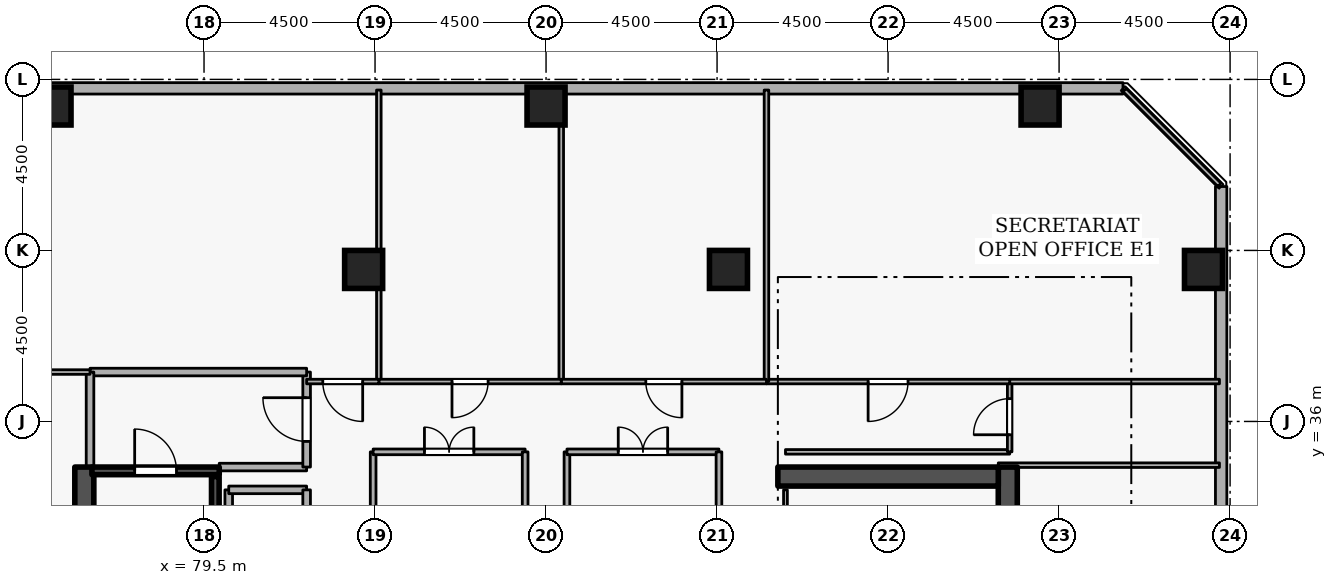
"""IFC4 building model, lengths in metres.
Left out: names, types, materials, properties, quantities, classifications, styles, units other than length and angle.
Written with IfcOpenShell. Run it as: python <this file> out.ifc"""

import sys

from ifc_helpers import new_model, si_unit, direction, frame, frame_2d, origin, origin_2d, place, context, subcontext, project, spatial, rectangle, extrude, element, fill, save


model = new_model("IFC4")
c1 = context("Model", 3, precision=1e-05, world=origin(), true_north=direction((0.0, 1.0)))
c2 = subcontext(c1, "Body", "Model", "MODEL_VIEW")
j1 = project(units=[si_unit("LENGTHUNIT", "METRE"), si_unit("PLANEANGLEUNIT", "RADIAN")], contexts=[c1])
p1 = place(None, origin())
s1 = spatial("IfcSite", under=j1, at=p1, CompositionType="ELEMENT")
p2 = place(p1, origin())
s2 = spatial("IfcBuilding", under=s1, at=p2, CompositionType="ELEMENT")
p3 = place(p2, frame((0.0, 0.0, 225.9)))
s3 = spatial("IfcBuildingStorey", under=s2, at=p3, CompositionType="ELEMENT", Elevation=225.9)
p4 = place(p3, frame((100.65, 19.2, 0.0), z_axis=(0.0, 0.0, 1.0), x_axis=(0.0, 1.0, 0.0)))
e1 = element("IfcWall", 1, at=p4, inside=s3, PredefinedType="SHEAR", context=c2, shape_type="SweptSolid", body=[
    extrude(rectangle(XDim=15.6, YDim=0.5, at=frame_2d((7.8, 0.0))), origin(), (0.0, 0.0, 1.0), 3.6),
])
p5 = place(p3, frame((94.6, 34.55, 0.0), z_axis=(0.0, 0.0, 1.0), x_axis=(1.0, 0.0, 0.0)))
e2 = element("IfcWall", 2, at=p5, inside=s3, PredefinedType="SHEAR", context=c2, shape_type="SweptSolid", body=[
    extrude(rectangle(XDim=5.8, YDim=0.5, at=frame_2d((2.9, 0.0))), origin(), (0.0, 0.0, 1.0), 3.6),
])
p6 = place(p3, frame((76.35, 19.2, 0.0), z_axis=(0.0, 0.0, 1.0), x_axis=(0.0, 1.0, 0.0)))
e3 = element("IfcWall", 3, at=p6, inside=s3, PredefinedType="SHEAR", context=c2, shape_type="SweptSolid", body=[
    extrude(rectangle(XDim=15.6, YDim=0.5, at=frame_2d((7.8, 0.0))), origin(), (0.0, 0.0, 1.0), 3.6),
])
for number, where, z_axis, x_axis in (
    (4, (105.8, 40.0, 0.0), (0.0, 0.0, 1.0), (1.0, 0.0, 0.0)),
    (5, (101.5, 44.3, 0.0), (0.0, 0.0, 1.0), (1.0, 0.0, 0.0)),
    (6, (88.5, 44.3, 0.0), (0.0, 0.0, 1.0), (1.0, 0.0, 0.0)),
    (7, (75.5, 44.3, 0.0), (0.0, 0.0, 1.0), (1.0, 0.0, 0.0)),
    (8, (93.3, 40.0, 0.0), (0.0, 0.0, 1.0), (1.0, 0.0, 0.0)),
    (9, (83.7, 40.0, 0.0), (0.0, 0.0, 1.0), (1.0, 0.0, 0.0)),
):
    element("IfcColumn", number, at=place(p3, frame(where, z_axis=z_axis, x_axis=x_axis)), inside=s3, PredefinedType="COLUMN", context=c2, shape_type="SweptSolid", body=[
        extrude(rectangle(XDim=1.0, YDim=1.0, at=origin_2d()), origin(), (0.0, 0.0, 1.0), 3.6),
    ])
p7 = place(p3, frame((106.265, 5.819, 0.0), z_axis=(0.0, 0.0, 1.0), x_axis=(0.0, 1.0, 0.0)))
e10 = element("IfcWall", 10, at=p7, inside=s3, PredefinedType="STANDARD", context=c2, shape_type="SweptSolid", body=[
    extrude(rectangle(XDim=36.363, YDim=0.3, at=frame_2d((18.181, 0.0))), origin(), (0.0, 0.0, 1.0), 2.22),
])
p8 = place(p7, frame((1.8, 0.0, 0.72)))
e11 = element("IfcOpeningElement", 11, at=p8, cuts=e10, PredefinedType="OPENING", context=c2, shape_type="SweptSolid", body=[
    extrude(rectangle(XDim=1.35, YDim=1.05, at=frame_2d((0.675, 0.525))), frame((0.0, 0.16, 0.0), z_axis=(0.0, -1.0, 0.0), x_axis=(1.0, 0.0, 0.0)), (0.0, 0.0, 1.0), 0.32),
])
p9 = place(p3, frame((103.681, 44.765, 0.0), z_axis=(0.0, 0.0, 1.0), x_axis=(-1.0, 0.0, 0.0)))
e12 = element("IfcWall", 12, at=p9, inside=s3, PredefinedType="STANDARD", context=c2, shape_type="SweptSolid", body=[
    extrude(rectangle(XDim=36.363, YDim=0.3, at=frame_2d((18.181, 0.0))), origin(), (0.0, 0.0, 1.0), 2.22),
])
p10 = place(p9, frame((30.6, 0.0, 0.72)))
e13 = element("IfcOpeningElement", 13, at=p10, cuts=e12, PredefinedType="OPENING", context=c2, shape_type="SweptSolid", body=[
    extrude(rectangle(XDim=1.35, YDim=1.05, at=frame_2d((0.675, 0.525))), frame((0.0, 0.16, 0.0), z_axis=(0.0, -1.0, 0.0), x_axis=(1.0, 0.0, 0.0)), (0.0, 0.0, 1.0), 0.32),
])
p11 = place(p3, frame((76.55, 34.7, 0.0), z_axis=(0.0, 0.0, 1.0), x_axis=(1.0, 0.0, 0.0)))
e14 = element("IfcWall", 14, at=p11, inside=s3, PredefinedType="SHEAR", context=c2, shape_type="SweptSolid", body=[
    extrude(rectangle(XDim=3.35, YDim=0.2, at=frame_2d((1.675, 0.0))), origin(), (0.0, 0.0, 1.0), 3.6),
])
p12 = place(p11, frame((1.125, 0.0, 0.0)))
e15 = element("IfcOpeningElement", 15, at=p12, cuts=e14, PredefinedType="OPENING", context=c2, shape_type="SweptSolid", body=[
    extrude(rectangle(XDim=1.1, YDim=2.1, at=frame_2d((0.55, 1.05))), frame((0.0, 0.11, 0.0), z_axis=(0.0, -1.0, 0.0), x_axis=(1.0, 0.0, 0.0)), (0.0, 0.0, 1.0), 0.22),
])
p13 = place(p3, frame((79.797, 27.45, 0.0), z_axis=(0.0, 0.0, 1.0), x_axis=(0.0, 1.0, 0.0)))
e16 = element("IfcWall", 16, at=p13, inside=s3, PredefinedType="SHEAR", context=c2, shape_type="SweptSolid", body=[
    extrude(rectangle(XDim=7.1, YDim=0.2, at=frame_2d((3.55, 0.0))), origin(), (0.0, 0.0, 1.0), 3.6),
])
p14 = place(p3, frame((79.9, 34.8, 0.0), z_axis=(0.0, 0.0, 1.0), x_axis=(1.0, 0.0, 0.0)))
e17 = element("IfcWall", 17, at=p14, inside=s3, PredefinedType="STANDARD", context=c2, shape_type="SweptSolid", body=[
    extrude(rectangle(XDim=2.3, YDim=0.2, at=frame_2d((1.15, 0.0))), origin(), (0.0, 0.0, 1.0), 2.505),
])
p15 = place(p3, frame((82.2, 34.8, 0.0), z_axis=(0.0, 0.0, 1.0), x_axis=(0.0, 1.0, 0.0)))
e18 = element("IfcWall", 18, at=p15, inside=s3, PredefinedType="STANDARD", context=c2, shape_type="SweptSolid", body=[
    extrude(rectangle(XDim=2.5, YDim=0.2, at=frame_2d((1.25, 0.0))), origin(), (0.0, 0.0, 1.0), 3.3),
])
p16 = place(p15, frame((0.675, 0.0, 0.0)))
e19 = element("IfcOpeningElement", 19, at=p16, cuts=e18, PredefinedType="OPENING", context=c2, shape_type="SweptSolid", body=[
    extrude(rectangle(XDim=1.15, YDim=2.1, at=frame_2d((0.575, 1.05))), frame((0.0, 0.11, 0.0), z_axis=(0.0, -1.0, 0.0), x_axis=(1.0, 0.0, 0.0)), (0.0, 0.0, 1.0), 0.22),
])
p17 = place(p3, frame((82.2, 37.3, 0.0), z_axis=(0.0, 0.0, 1.0), x_axis=(-1.0, 0.0, 0.0)))
e20 = element("IfcWall", 20, at=p17, inside=s3, PredefinedType="STANDARD", context=c2, shape_type="SweptSolid", body=[
    extrude(rectangle(XDim=5.7, YDim=0.2, at=frame_2d((2.85, 0.0))), origin(), (0.0, 0.0, 1.0), 3.3),
])
p18 = place(p3, frame((76.5, 37.3, 0.0), z_axis=(0.0, 0.0, 1.0), x_axis=(0.0, -1.0, 0.0)))
e21 = element("IfcWall", 21, at=p18, inside=s3, PredefinedType="STANDARD", context=c2, shape_type="SweptSolid", body=[
    extrude(rectangle(XDim=2.5, YDim=0.2, at=frame_2d((1.25, 0.0))), origin(), (0.0, 0.0, 1.0), 3.3),
])
p19 = place(p3, frame((80.15, 31.85, 0.0), z_axis=(0.0, 0.0, 1.0), x_axis=(0.0, 1.0, 0.0)))
e22 = element("IfcWall", 22, at=p19, inside=s3, PredefinedType="STANDARD", context=c2, shape_type="SweptSolid", body=[
    extrude(rectangle(XDim=2.35, YDim=0.2, at=frame_2d((1.175, 0.0))), origin(), (0.0, 0.0, 1.0), 3.3),
])
p20 = place(p3, frame((80.15, 34.2, 0.0), z_axis=(0.0, 0.0, 1.0), x_axis=(1.0, 0.0, 0.0)))
e23 = element("IfcWall", 23, at=p20, inside=s3, PredefinedType="STANDARD", context=c2, shape_type="SweptSolid", body=[
    extrude(rectangle(XDim=2.05, YDim=0.2, at=frame_2d((1.025, 0.0))), origin(), (0.0, 0.0, 1.0), 2.505),
])
p21 = place(p3, frame((82.2, 34.2, 0.0), z_axis=(0.0, 0.0, 1.0), x_axis=(0.0, -1.0, 0.0)))
e24 = element("IfcWall", 24, at=p21, inside=s3, PredefinedType="STANDARD", context=c2, shape_type="SweptSolid", body=[
    extrude(rectangle(XDim=2.35, YDim=0.2, at=frame_2d((1.175, 0.0))), origin(), (0.0, 0.0, 1.0), 3.3),
])
p22 = place(p21, frame((0.6, 0.0, 0.0)))
e25 = element("IfcOpeningElement", 25, at=p22, cuts=e24, PredefinedType="OPENING", context=c2, shape_type="SweptSolid", body=[
    extrude(rectangle(XDim=1.15, YDim=2.1, at=frame_2d((0.575, 1.05))), frame((0.0, 0.11, 0.0), z_axis=(0.0, -1.0, 0.0), x_axis=(1.0, 0.0, 0.0)), (0.0, 0.0, 1.0), 0.22),
])
p23 = place(p3, frame((94.8, 32.05, 0.0), z_axis=(0.0, 0.0, 1.0), x_axis=(0.0, 1.0, 0.0)))
e26 = element("IfcWall", 26, at=p23, inside=s3, PredefinedType="PARTITIONING", context=c2, shape_type="SweptSolid", body=[
    extrude(rectangle(XDim=2.15, YDim=0.1, at=frame_2d((1.075, 0.0))), origin(), (0.0, 0.0, 1.0), 3.3),
])
p24 = place(p23, frame((0.6, 0.0, 0.0)))
e27 = element("IfcOpeningElement", 27, at=p24, cuts=e26, PredefinedType="OPENING", context=c2, shape_type="SweptSolid", body=[
    extrude(rectangle(XDim=0.95, YDim=2.1, at=frame_2d((0.475, 1.05))), frame((0.0, 0.06, 0.0), z_axis=(0.0, -1.0, 0.0), x_axis=(1.0, 0.0, 0.0)), (0.0, 0.0, 1.0), 0.12),
])
p25 = place(p3, frame((94.8, 35.2, 0.0), z_axis=(0.0, 0.0, 1.0), x_axis=(1.0, 0.0, 0.0)))
e28 = element("IfcWall", 28, at=p25, inside=s3, PredefinedType="PARTITIONING", context=c2, shape_type="SweptSolid", body=[
    extrude(rectangle(XDim=5.9, YDim=0.12, at=frame_2d((2.95, 0.0))), origin(), (0.0, 0.0, 1.0), 3.3),
])
p26 = place(p3, frame((100.7, 35.2, 0.0), z_axis=(0.0, 0.0, 1.0), x_axis=(0.0, 1.0, 0.0)))
e29 = element("IfcWall", 29, at=p26, inside=s3, PredefinedType="PARTITIONING", context=c2, shape_type="SweptSolid", body=[
    extrude(rectangle(XDim=1.85, YDim=0.12, at=frame_2d((0.925, 0.0))), origin(), (0.0, 0.0, 1.0), 3.3),
])
p27 = place(p26, frame((0.45, 0.0, 0.0)))
e30 = element("IfcOpeningElement", 30, at=p27, cuts=e29, PredefinedType="OPENING", context=c2, shape_type="SweptSolid", body=[
    extrude(rectangle(XDim=0.95, YDim=2.1, at=frame_2d((0.475, 1.05))), frame((0.0, 0.07, 0.0), z_axis=(0.0, -1.0, 0.0), x_axis=(1.0, 0.0, 0.0)), (0.0, 0.0, 1.0), 0.14),
])
p28 = place(p3, frame((100.7, 37.05, 0.0), z_axis=(0.0, 0.0, 1.0), x_axis=(1.0, 0.0, 0.0)))
e31 = element("IfcWall", 31, at=p28, inside=s3, PredefinedType="PARTITIONING", context=c2, shape_type="SweptSolid", body=[
    extrude(rectangle(XDim=5.52, YDim=0.12, at=frame_2d((2.76, 0.0))), origin(), (0.0, 0.0, 1.0), 3.3),
])
p29 = place(p3, frame((106.22, 34.85, 0.0), z_axis=(0.0, 0.0, 1.0), x_axis=(-1.0, 0.0, 0.0)))
e32 = element("IfcWall", 32, at=p29, inside=s3, PredefinedType="PARTITIONING", context=c2, shape_type="SweptSolid", body=[
    extrude(rectangle(XDim=5.82, YDim=0.12, at=frame_2d((2.91, 0.0))), origin(), (0.0, 0.0, 1.0), 2.505),
])
p30 = place(p3, frame((100.7, 37.05, 0.0), z_axis=(0.0, 0.0, 1.0), x_axis=(-1.0, 0.0, 0.0)))
e33 = element("IfcWall", 33, at=p30, inside=s3, PredefinedType="PARTITIONING", context=c2, shape_type="SweptSolid", body=[
    extrude(rectangle(XDim=6.4, YDim=0.12, at=frame_2d((3.2, 0.0))), origin(), (0.0, 0.0, 1.0), 3.3),
])
p31 = place(p30, frame((2.675, 0.0, 0.0)))
e34 = element("IfcOpeningElement", 34, at=p31, cuts=e33, PredefinedType="OPENING", context=c2, shape_type="SweptSolid", body=[
    extrude(rectangle(XDim=1.05, YDim=2.1, at=frame_2d((0.525, 1.05))), frame((0.0, 0.07, 0.0), z_axis=(0.0, -1.0, 0.0), x_axis=(1.0, 0.0, 0.0)), (0.0, 0.0, 1.0), 0.14),
])
p32 = place(p3, frame((94.3, 37.05, 0.0), z_axis=(0.0, 0.0, 1.0), x_axis=(0.0, 1.0, 0.0)))
e35 = element("IfcWall", 35, at=p32, inside=s3, PredefinedType="PARTITIONING", context=c2, shape_type="SweptSolid", body=[
    extrude(rectangle(XDim=7.67, YDim=0.12, at=frame_2d((3.835, 0.0))), origin(), (0.0, 0.0, 1.0), 3.3),
])
p33 = place(p3, frame((103.725, 44.72, 0.0), z_axis=(0.0, 0.0, 1.0), x_axis=(0.707106781187, -0.707106781187, 0.0)))
e36 = element("IfcWall", 36, at=p33, inside=s3, PredefinedType="PARTITIONING", context=c2, shape_type="SweptSolid", body=[
    extrude(rectangle(XDim=3.528, YDim=0.12, at=frame_2d((1.764, 0.0))), origin(), (0.0, 0.0, 1.0), 3.3),
])
p34 = place(p3, frame((88.9, 37.05, 0.0), z_axis=(0.0, 0.0, 1.0), x_axis=(0.0, 1.0, 0.0)))
e37 = element("IfcWall", 37, at=p34, inside=s3, PredefinedType="PARTITIONING", context=c2, shape_type="SweptSolid", body=[
    extrude(rectangle(XDim=7.67, YDim=0.12, at=frame_2d((3.835, 0.0))), origin(), (0.0, 0.0, 1.0), 3.3),
])
p35 = place(p3, frame((94.3, 37.05, 0.0), z_axis=(0.0, 0.0, 1.0), x_axis=(-1.0, 0.0, 0.0)))
e38 = element("IfcWall", 38, at=p35, inside=s3, PredefinedType="PARTITIONING", context=c2, shape_type="SweptSolid", body=[
    extrude(rectangle(XDim=5.4, YDim=0.12, at=frame_2d((2.7, 0.0))), origin(), (0.0, 0.0, 1.0), 3.3),
])
p36 = place(p35, frame((2.225, 0.0, 0.0)))
e39 = element("IfcOpeningElement", 39, at=p36, cuts=e38, PredefinedType="OPENING", context=c2, shape_type="SweptSolid", body=[
    extrude(rectangle(XDim=0.95, YDim=2.1, at=frame_2d((0.475, 1.05))), frame((0.0, 0.07, 0.0), z_axis=(0.0, -1.0, 0.0), x_axis=(1.0, 0.0, 0.0)), (0.0, 0.0, 1.0), 0.14),
])
p37 = place(p3, frame((84.1, 37.05, 0.0), z_axis=(0.0, 0.0, 1.0), x_axis=(0.0, 1.0, 0.0)))
e40 = element("IfcWall", 40, at=p37, inside=s3, PredefinedType="PARTITIONING", context=c2, shape_type="SweptSolid", body=[
    extrude(rectangle(XDim=7.67, YDim=0.12, at=frame_2d((3.835, 0.0))), origin(), (0.0, 0.0, 1.0), 3.3),
])
p38 = place(p3, frame((88.9, 37.05, 0.0), z_axis=(0.0, 0.0, 1.0), x_axis=(-1.0, 0.0, 0.0)))
e41 = element("IfcWall", 41, at=p38, inside=s3, PredefinedType="PARTITIONING", context=c2, shape_type="SweptSolid", body=[
    extrude(rectangle(XDim=4.8, YDim=0.12, at=frame_2d((2.4, 0.0))), origin(), (0.0, 0.0, 1.0), 3.3),
])
p39 = place(p38, frame((1.925, 0.0, 0.0)))
e42 = element("IfcOpeningElement", 42, at=p39, cuts=e41, PredefinedType="OPENING", context=c2, shape_type="SweptSolid", body=[
    extrude(rectangle(XDim=0.95, YDim=2.1, at=frame_2d((0.475, 1.05))), frame((0.0, 0.07, 0.0), z_axis=(0.0, -1.0, 0.0), x_axis=(1.0, 0.0, 0.0)), (0.0, 0.0, 1.0), 0.14),
])
p40 = place(p3, frame((76.5, 37.3, 0.0), z_axis=(0.0, 0.0, 1.0), x_axis=(-1.0, 0.0, 0.0)))
e43 = element("IfcWall", 43, at=p40, inside=s3, PredefinedType="PARTITIONING", context=c2, shape_type="SweptSolid", body=[
    extrude(rectangle(XDim=11.72, YDim=0.12, at=frame_2d((5.86, 0.0))), origin(), (0.0, 0.0, 1.0), 3.3),
])
p41 = place(p3, frame((84.1, 37.05, 0.0), z_axis=(0.0, 0.0, 1.0), x_axis=(-1.0, 0.0, 0.0)))
e44 = element("IfcWall", 44, at=p41, inside=s3, PredefinedType="PARTITIONING", context=c2, shape_type="SweptSolid", body=[
    extrude(rectangle(XDim=1.9, YDim=0.12, at=frame_2d((0.95, 0.0))), origin(), (0.0, 0.0, 1.0), 3.3),
])
p42 = place(p41, frame((0.425, 0.0, 0.0)))
e45 = element("IfcOpeningElement", 45, at=p42, cuts=e44, PredefinedType="OPENING", context=c2, shape_type="SweptSolid", body=[
    extrude(rectangle(XDim=1.05, YDim=2.1, at=frame_2d((0.525, 1.05))), frame((0.0, 0.07, 0.0), z_axis=(0.0, -1.0, 0.0), x_axis=(1.0, 0.0, 0.0)), (0.0, 0.0, 1.0), 0.14),
])
p43 = place(p3, frame((89.05, 32.2, 0.0), z_axis=(0.0, 0.0, 1.0), x_axis=(0.0, 1.0, 0.0)))
e46 = element("IfcWall", 46, at=p43, inside=s3, PredefinedType="PARTITIONING", context=c2, shape_type="SweptSolid", body=[
    extrude(rectangle(XDim=3.0, YDim=0.15, at=frame_2d((1.5, 0.0))), origin(), (0.0, 0.0, 1.0), 3.3),
])
p44 = place(p3, frame((89.05, 35.2, 0.0), z_axis=(0.0, 0.0, 1.0), x_axis=(1.0, 0.0, 0.0)))
e47 = element("IfcWall", 47, at=p44, inside=s3, PredefinedType="PARTITIONING", context=c2, shape_type="SweptSolid", body=[
    extrude(rectangle(XDim=4.0, YDim=0.15, at=frame_2d((2.0, 0.0))), origin(), (0.0, 0.0, 1.0), 3.3),
])
p45 = place(p44, frame((1.35, 0.0, 0.0)))
e48 = element("IfcOpeningElement", 48, at=p45, cuts=e47, PredefinedType="OPENING", context=c2, shape_type="SweptSolid", body=[
    extrude(rectangle(XDim=1.3, YDim=2.12, at=frame_2d((0.65, 1.06))), frame((0.0, 0.085, 0.0), z_axis=(0.0, -1.0, 0.0), x_axis=(1.0, 0.0, 0.0)), (0.0, 0.0, 1.0), 0.17),
])
for number, where, z_axis, x_axis in (
    (49, (93.05, 35.2, 0.0), (0.0, 0.0, 1.0), (0.0, -1.0, 0.0)),
    (50, (83.95, 32.2, 0.0), (0.0, 0.0, 1.0), (0.0, 1.0, 0.0)),
):
    element("IfcWall", number, at=place(p3, frame(where, z_axis=z_axis, x_axis=x_axis)), inside=s3, PredefinedType="PARTITIONING", context=c2, shape_type="SweptSolid", body=[
        extrude(rectangle(XDim=3.0, YDim=0.15, at=frame_2d((1.5, 0.0))), origin(), (0.0, 0.0, 1.0), 3.3),
    ])
p46 = place(p3, frame((83.95, 35.2, 0.0), z_axis=(0.0, 0.0, 1.0), x_axis=(1.0, 0.0, 0.0)))
e51 = element("IfcWall", 51, at=p46, inside=s3, PredefinedType="PARTITIONING", context=c2, shape_type="SweptSolid", body=[
    extrude(rectangle(XDim=4.0, YDim=0.15, at=frame_2d((2.0, 0.0))), origin(), (0.0, 0.0, 1.0), 3.3),
])
p47 = place(p46, frame((1.35, 0.0, 0.0)))
e52 = element("IfcOpeningElement", 52, at=p47, cuts=e51, PredefinedType="OPENING", context=c2, shape_type="SweptSolid", body=[
    extrude(rectangle(XDim=1.3, YDim=2.12, at=frame_2d((0.65, 1.06))), frame((0.0, 0.085, 0.0), z_axis=(0.0, -1.0, 0.0), x_axis=(1.0, 0.0, 0.0)), (0.0, 0.0, 1.0), 0.17),
])
p48 = place(p3, frame((87.95, 35.2, 0.0), z_axis=(0.0, 0.0, 1.0), x_axis=(0.0, -1.0, 0.0)))
e53 = element("IfcWall", 53, at=p48, inside=s3, PredefinedType="PARTITIONING", context=c2, shape_type="SweptSolid", body=[
    extrude(rectangle(XDim=3.0, YDim=0.15, at=frame_2d((1.5, 0.0))), origin(), (0.0, 0.0, 1.0), 3.3),
])
p49 = place(p12, origin())
e54 = element("IfcDoor", 54, at=p49, inside=s3, OperationType="SINGLE_SWING_LEFT", PredefinedType="DOOR", context=c2, shape_type="SweptSolid", body=[
    extrude(rectangle(XDim=1.1, YDim=2.1, at=frame_2d((0.55, 1.05))), frame((0.0, 0.025, 0.0), z_axis=(0.0, -1.0, 0.0), x_axis=(1.0, 0.0, 0.0)), (0.0, 0.0, 1.0), 0.05),
])
fill(e15, e54)
p50 = place(p16, origin())
e55 = element("IfcDoor", 55, at=p50, inside=s3, OperationType="SINGLE_SWING_RIGHT", PredefinedType="DOOR", context=c2, shape_type="SweptSolid", body=[
    extrude(rectangle(XDim=1.15, YDim=2.1, at=frame_2d((0.575, 1.05))), frame((0.0, 0.025, 0.0), z_axis=(0.0, -1.0, 0.0), x_axis=(1.0, 0.0, 0.0)), (0.0, 0.0, 1.0), 0.05),
])
fill(e19, e55)
p51 = place(p27, origin())
e56 = element("IfcDoor", 56, at=p51, inside=s3, OperationType="SINGLE_SWING_LEFT", PredefinedType="DOOR", context=c2, shape_type="SweptSolid", body=[
    extrude(rectangle(XDim=0.95, YDim=2.1, at=frame_2d((0.475, 1.05))), frame((0.0, 0.025, 0.0), z_axis=(0.0, -1.0, 0.0), x_axis=(1.0, 0.0, 0.0)), (0.0, 0.0, 1.0), 0.05),
])
fill(e30, e56)
p52 = place(p31, origin())
e57 = element("IfcDoor", 57, at=p52, inside=s3, OperationType="SINGLE_SWING_RIGHT", PredefinedType="DOOR", context=c2, shape_type="SweptSolid", body=[
    extrude(rectangle(XDim=1.05, YDim=2.1, at=frame_2d((0.525, 1.05))), frame((0.0, 0.025, 0.0), z_axis=(0.0, -1.0, 0.0), x_axis=(1.0, 0.0, 0.0)), (0.0, 0.0, 1.0), 0.05),
])
fill(e34, e57)
p53 = place(p36, origin())
e58 = element("IfcDoor", 58, at=p53, inside=s3, OperationType="SINGLE_SWING_LEFT", PredefinedType="DOOR", context=c2, shape_type="SweptSolid", body=[
    extrude(rectangle(XDim=0.95, YDim=2.1, at=frame_2d((0.475, 1.05))), frame((0.0, 0.025, 0.0), z_axis=(0.0, -1.0, 0.0), x_axis=(1.0, 0.0, 0.0)), (0.0, 0.0, 1.0), 0.05),
])
fill(e39, e58)
p54 = place(p39, origin())
e59 = element("IfcDoor", 59, at=p54, inside=s3, OperationType="SINGLE_SWING_RIGHT", PredefinedType="DOOR", context=c2, shape_type="SweptSolid", body=[
    extrude(rectangle(XDim=0.95, YDim=2.1, at=frame_2d((0.475, 1.05))), frame((0.0, 0.025, 0.0), z_axis=(0.0, -1.0, 0.0), x_axis=(1.0, 0.0, 0.0)), (0.0, 0.0, 1.0), 0.05),
])
fill(e42, e59)
p55 = place(p42, origin())
e60 = element("IfcDoor", 60, at=p55, inside=s3, OperationType="SINGLE_SWING_LEFT", PredefinedType="DOOR", context=c2, shape_type="SweptSolid", body=[
    extrude(rectangle(XDim=1.05, YDim=2.1, at=frame_2d((0.525, 1.05))), frame((0.0, 0.025, 0.0), z_axis=(0.0, -1.0, 0.0), x_axis=(1.0, 0.0, 0.0)), (0.0, 0.0, 1.0), 0.05),
])
fill(e45, e60)
p56 = place(p45, origin())
e61 = element("IfcDoor", 61, at=p56, inside=s3, OperationType="DOUBLE_DOOR_SINGLE_SWING", PredefinedType="DOOR", context=c2, shape_type="SweptSolid", body=[
    extrude(rectangle(XDim=1.3, YDim=2.12, at=frame_2d((0.65, 1.06))), frame((0.0, 0.025, 0.0), z_axis=(0.0, -1.0, 0.0), x_axis=(1.0, 0.0, 0.0)), (0.0, 0.0, 1.0), 0.05),
])
fill(e48, e61)
p57 = place(p47, origin())
e62 = element("IfcDoor", 62, at=p57, inside=s3, OperationType="DOUBLE_DOOR_SINGLE_SWING", PredefinedType="DOOR", context=c2, shape_type="SweptSolid", body=[
    extrude(rectangle(XDim=1.3, YDim=2.12, at=frame_2d((0.65, 1.06))), frame((0.0, 0.025, 0.0), z_axis=(0.0, -1.0, 0.0), x_axis=(1.0, 0.0, 0.0)), (0.0, 0.0, 1.0), 0.05),
])
fill(e52, e62)
save(model, sys.argv[1])
